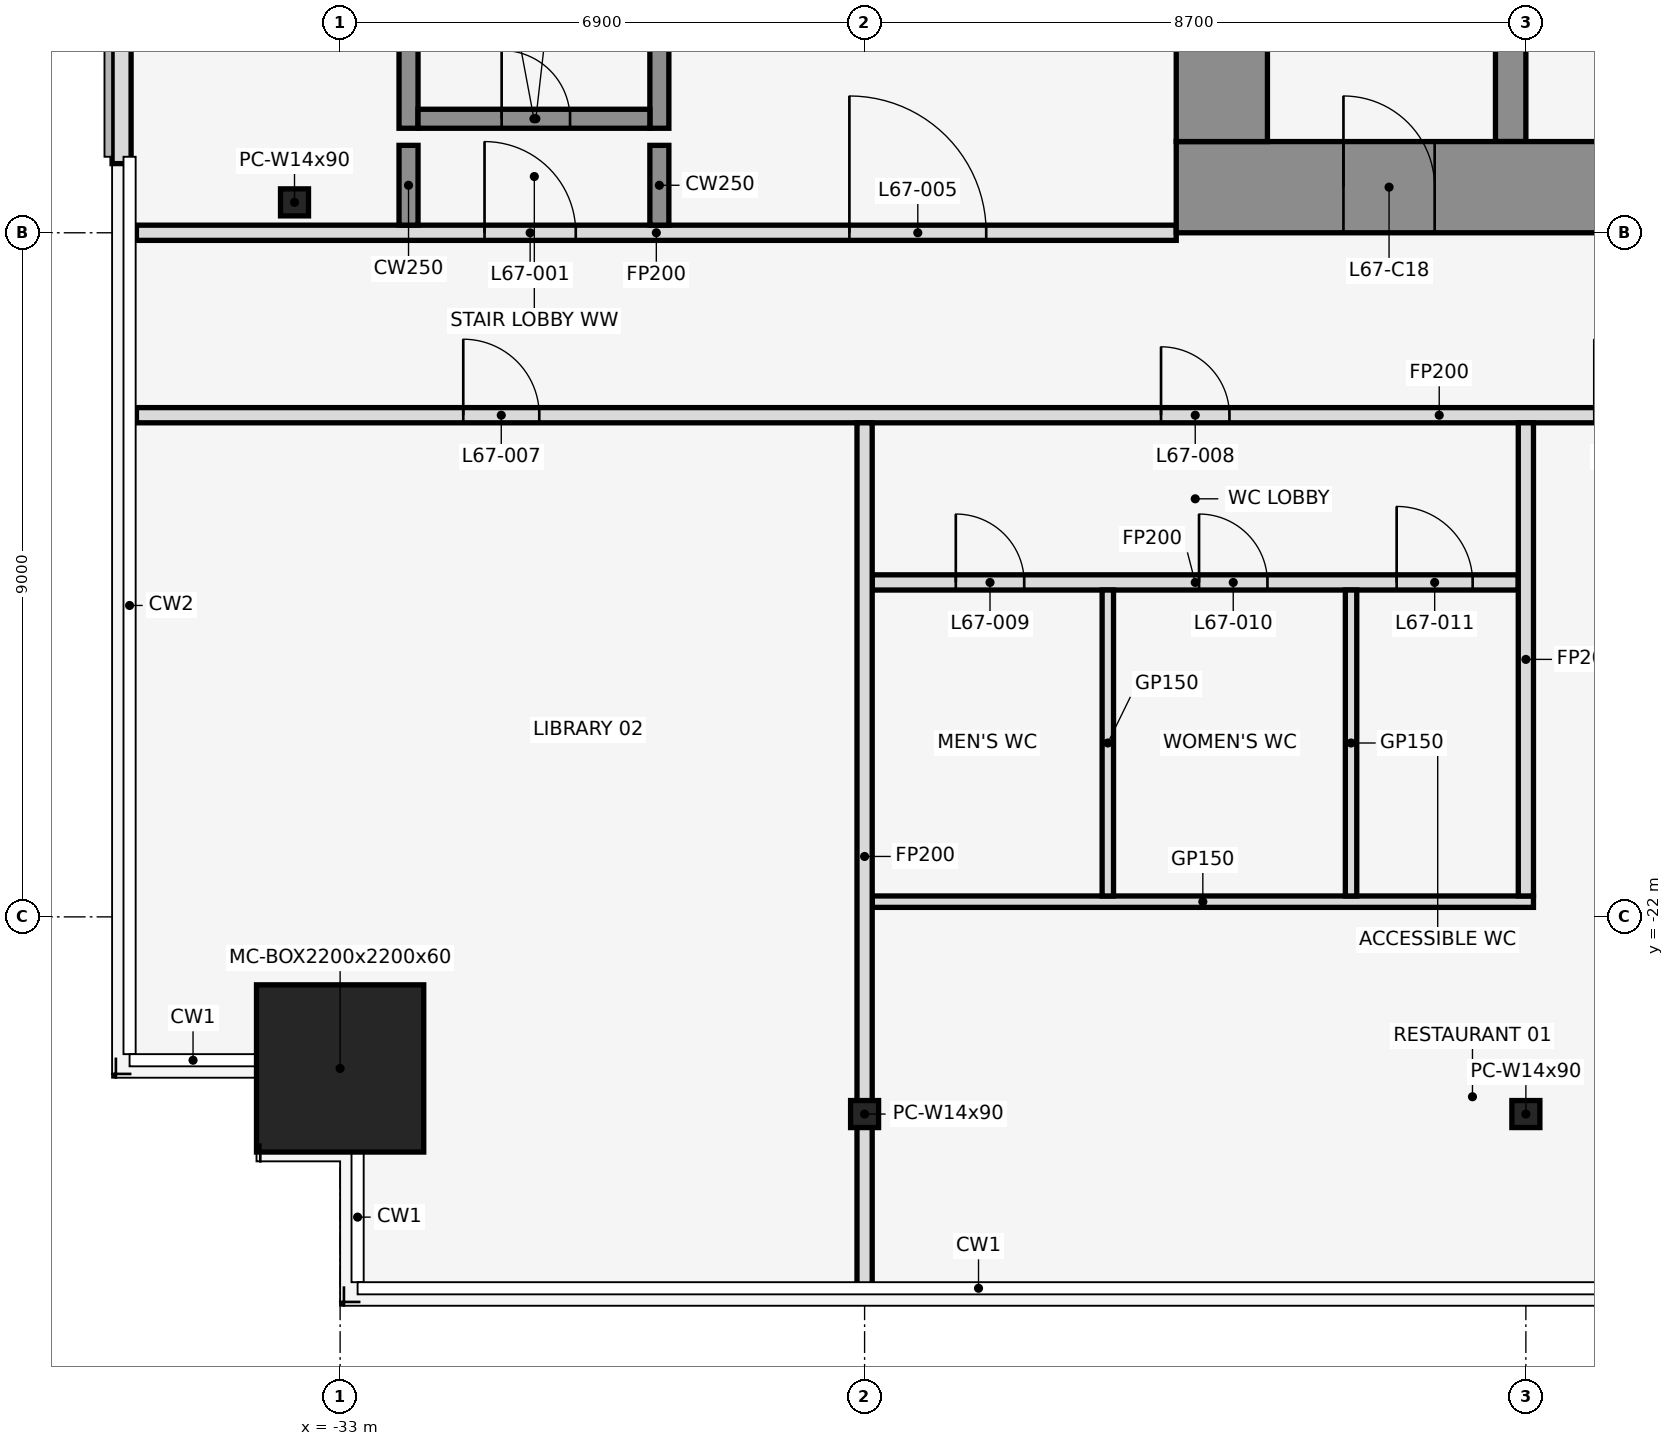
"""IFC4 building model, lengths in metres.
Left out: names, types, materials, properties, quantities, classifications, styles, units other than length and angle.
Written with IfcOpenShell. Run it as: python <this file> out.ifc"""

import sys

from ifc_helpers import new_model, si_unit, direction, frame, frame_2d, origin, origin_2d, place, context, subcontext, project, spatial, rectangle, hollow_rectangle, i_section, extrude, element, fill, save


model = new_model("IFC4")
c1 = context("Model", 3, precision=1e-05, world=origin(), true_north=direction((0.0, 1.0)))
c2 = subcontext(c1, "Body", "Model", "MODEL_VIEW")
j1 = project(units=[si_unit("LENGTHUNIT", "METRE"), si_unit("PLANEANGLEUNIT", "RADIAN")], contexts=[c1])
p1 = place(None, origin())
s1 = spatial("IfcSite", under=j1, at=p1, CompositionType="ELEMENT")
p2 = place(p1, origin())
s2 = spatial("IfcBuilding", under=s1, at=p2, CompositionType="ELEMENT")
p3 = place(p2, frame((0.0, 0.0, 297.5)))
s3 = spatial("IfcBuildingStorey", under=s2, at=p3, CompositionType="ELEMENT", Elevation=297.5)
p4 = place(p3, frame((-33.0, -23.994, 0.0), z_axis=(0.0, 0.0, 1.0), x_axis=(1.0, 0.0, 0.0)))
e1 = element("IfcColumn", 1, at=p4, inside=s3, PredefinedType="COLUMN", context=c2, shape_type="SweptSolid", body=[
    extrude(hollow_rectangle(XDim=2.2, YDim=2.2, WallThickness=0.06, at=origin_2d()), origin(), (0.0, 0.0, 1.0), 4.5),
])
for number, where, z_axis, x_axis in (
    (2, (-26.1, -24.594, 0.0), (0.0, 0.0, 1.0), (1.0, 0.0, 0.0)),
    (3, (-17.4, -24.594, 0.0), (0.0, 0.0, 1.0), (1.0, 0.0, 0.0)),
    (4, (-33.6, -12.6, 0.0), (0.0, 0.0, 1.0), (1.0, 0.0, 0.0)),
):
    element("IfcColumn", number, at=place(p3, frame(where, z_axis=z_axis, x_axis=x_axis)), inside=s3, PredefinedType="COLUMN", context=c2, shape_type="SweptSolid", body=[
        extrude(i_section(OverallWidth=0.368, OverallDepth=0.356, WebThickness=0.011, FlangeThickness=0.018, at=origin_2d()), origin(), (0.0, 0.0, 1.0), 4.5),
    ])
p5 = place(p3, frame((-35.875, -3.0, 0.0), z_axis=(0.0, 0.0, 1.0), x_axis=(0.0, -1.0, 0.0)))
e5 = element("IfcWall", 5, at=p5, inside=s3, PredefinedType="STANDARD", context=c2, shape_type="SweptSolid", body=[
    extrude(rectangle(XDim=9.09, YDim=0.25, at=frame_2d((4.545, 0.0))), origin(), (0.0, 0.0, 1.0), 4.35),
])
p6 = place(p3, frame((-32.1, -11.625, 0.0), z_axis=(0.0, 0.0, 1.0), x_axis=(0.0, 1.0, 0.0)))
e6 = element("IfcWall", 6, at=p6, inside=s3, PredefinedType="SHEAR", context=c2, shape_type="SweptSolid", body=[
    extrude(rectangle(XDim=7.525, YDim=0.25, at=frame_2d((3.762, 0.0))), origin(), (0.0, 0.0, 1.0), 4.5),
])
p7 = place(p3, frame((-28.8, -11.625, 0.0), z_axis=(0.0, 0.0, 1.0), x_axis=(0.0, 1.0, 0.0)))
e7 = element("IfcWall", 7, at=p7, inside=s3, PredefinedType="SHEAR", context=c2, shape_type="SweptSolid", body=[
    extrude(rectangle(XDim=7.25, YDim=0.25, at=frame_2d((3.625, 0.0))), origin(), (0.0, 0.0, 1.0), 4.5),
])
p8 = place(p3, frame((-31.975, -11.5, 0.0), z_axis=(0.0, 0.0, 1.0), x_axis=(1.0, 0.0, 0.0)))
e8 = element("IfcWall", 8, at=p8, inside=s3, PredefinedType="SHEAR", context=c2, shape_type="SweptSolid", body=[
    extrude(rectangle(XDim=3.05, YDim=0.25, at=frame_2d((1.525, 0.0))), origin(), (0.0, 0.0, 1.0), 4.5),
])
p9 = place(p8, frame((1.1, 0.0, 0.0)))
e9 = element("IfcOpeningElement", 9, at=p9, cuts=e8, PredefinedType="OPENING", context=c2, shape_type="SweptSolid", body=[
    extrude(rectangle(XDim=0.9, YDim=2.1, at=frame_2d((0.45, 1.05))), frame((0.0, 0.137, 0.0), z_axis=(0.0, -1.0, 0.0), x_axis=(1.0, 0.0, 0.0)), (0.0, 0.0, 1.0), 0.274),
])
p10 = place(p3, frame((-26.0, -21.8, 0.0), z_axis=(0.0, 0.0, 1.0), x_axis=(1.0, 0.0, 0.0)))
e10 = element("IfcWall", 10, at=p10, inside=s3, PredefinedType="PARTITIONING", context=c2, shape_type="SweptSolid", body=[
    extrude(rectangle(XDim=8.7, YDim=0.15, at=frame_2d((4.35, 0.0))), origin(), (0.0, 0.0, 1.0), 3.418),
])
p11 = place(p3, frame((-26.0, -17.6, 0.0), z_axis=(0.0, 0.0, 1.0), x_axis=(1.0, 0.0, 0.0)))
e11 = element("IfcWall", 11, at=p11, inside=s3, PredefinedType="PARTITIONING", context=c2, shape_type="SweptSolid", body=[
    extrude(rectangle(XDim=8.5, YDim=0.2, at=frame_2d((4.25, 0.0))), origin(), (0.0, 0.0, 1.0), 3.418),
])
p12 = place(p11, frame((1.1, 0.0, 0.0)))
e12 = element("IfcOpeningElement", 12, at=p12, cuts=e11, PredefinedType="OPENING", context=c2, shape_type="SweptSolid", body=[
    extrude(rectangle(XDim=0.9, YDim=2.1, at=frame_2d((0.45, 1.05))), frame((0.0, 0.112, 0.0), z_axis=(0.0, -1.0, 0.0), x_axis=(1.0, 0.0, 0.0)), (0.0, 0.0, 1.0), 0.224),
])
p13 = place(p11, frame((4.3, 0.0, 0.0)))
e13 = element("IfcOpeningElement", 13, at=p13, cuts=e11, PredefinedType="OPENING", context=c2, shape_type="SweptSolid", body=[
    extrude(rectangle(XDim=0.9, YDim=2.1, at=frame_2d((0.45, 1.05))), frame((0.0, 0.112, 0.0), z_axis=(0.0, -1.0, 0.0), x_axis=(1.0, 0.0, 0.0)), (0.0, 0.0, 1.0), 0.224),
])
p14 = place(p11, frame((6.9, 0.0, 0.0)))
e14 = element("IfcOpeningElement", 14, at=p14, cuts=e11, PredefinedType="OPENING", context=c2, shape_type="SweptSolid", body=[
    extrude(rectangle(XDim=1.0, YDim=2.1, at=frame_2d((0.5, 1.05))), frame((0.0, 0.112, 0.0), z_axis=(0.0, -1.0, 0.0), x_axis=(1.0, 0.0, 0.0)), (0.0, 0.0, 1.0), 0.224),
])
p15 = place(p3, frame((-35.68, -15.4, 0.0), z_axis=(0.0, 0.0, 1.0), x_axis=(1.0, 0.0, 0.0)))
e15 = element("IfcWall", 15, at=p15, inside=s3, PredefinedType="PARTITIONING", context=c2, shape_type="SweptSolid", body=[
    extrude(rectangle(XDim=34.28, YDim=0.2, at=frame_2d((17.14, 0.0))), origin(), (0.0, 0.0, 1.0), 3.418),
])
p16 = place(p15, frame((4.3, 0.0, 0.0)))
e16 = element("IfcOpeningElement", 16, at=p16, cuts=e15, PredefinedType="OPENING", context=c2, shape_type="SweptSolid", body=[
    extrude(rectangle(XDim=1.0, YDim=2.1, at=frame_2d((0.5, 1.05))), frame((0.0, 0.112, 0.0), z_axis=(0.0, -1.0, 0.0), x_axis=(1.0, 0.0, 0.0)), (0.0, 0.0, 1.0), 0.224),
])
p17 = place(p15, frame((13.48, 0.0, 0.0)))
e17 = element("IfcOpeningElement", 17, at=p17, cuts=e15, PredefinedType="OPENING", context=c2, shape_type="SweptSolid", body=[
    extrude(rectangle(XDim=0.9, YDim=2.1, at=frame_2d((0.45, 1.05))), frame((0.0, 0.112, 0.0), z_axis=(0.0, -1.0, 0.0), x_axis=(1.0, 0.0, 0.0)), (0.0, 0.0, 1.0), 0.224),
])
p18 = place(p15, frame((19.18, 0.0, 0.0)))
e18 = element("IfcOpeningElement", 18, at=p18, cuts=e15, PredefinedType="OPENING", context=c2, shape_type="SweptSolid", body=[
    extrude(rectangle(XDim=1.0, YDim=2.1, at=frame_2d((0.5, 1.05))), frame((0.0, 0.112, 0.0), z_axis=(0.0, -1.0, 0.0), x_axis=(1.0, 0.0, 0.0)), (0.0, 0.0, 1.0), 0.224),
])
p19 = place(p15, frame((23.58, 0.0, 0.0)))
e19 = element("IfcOpeningElement", 19, at=p19, cuts=e15, PredefinedType="OPENING", context=c2, shape_type="SweptSolid", body=[
    extrude(rectangle(XDim=1.0, YDim=2.1, at=frame_2d((0.5, 1.05))), frame((0.0, 0.112, 0.0), z_axis=(0.0, -1.0, 0.0), x_axis=(1.0, 0.0, 0.0)), (0.0, 0.0, 1.0), 0.224),
])
p20 = place(p3, frame((-35.68, -13.0, 0.0), z_axis=(0.0, 0.0, 1.0), x_axis=(1.0, 0.0, 0.0)))
e20 = element("IfcWall", 20, at=p20, inside=s3, PredefinedType="PARTITIONING", context=c2, shape_type="SweptSolid", body=[
    extrude(rectangle(XDim=13.68, YDim=0.2, at=frame_2d((6.84, 0.0))), origin(), (0.0, 0.0, 1.0), 3.418),
])
p21 = place(p20, frame((4.58, 0.0, 0.0)))
e21 = element("IfcOpeningElement", 21, at=p21, cuts=e20, PredefinedType="OPENING", context=c2, shape_type="SweptSolid", body=[
    extrude(rectangle(XDim=1.2, YDim=2.1, at=frame_2d((0.6, 1.05))), frame((0.0, 0.112, 0.0), z_axis=(0.0, -1.0, 0.0), x_axis=(1.0, 0.0, 0.0)), (0.0, 0.0, 1.0), 0.224),
])
p22 = place(p20, frame((9.38, 0.0, 0.0)))
e22 = element("IfcOpeningElement", 22, at=p22, cuts=e20, PredefinedType="OPENING", context=c2, shape_type="SweptSolid", body=[
    extrude(rectangle(XDim=1.8, YDim=2.1, at=frame_2d((0.9, 1.05))), frame((0.0, 0.112, 0.0), z_axis=(0.0, -1.0, 0.0), x_axis=(1.0, 0.0, 0.0)), (0.0, 0.0, 1.0), 0.224),
])
for number, where, z_axis, x_axis in (
    (23, (-32.1, -12.9, 0.0), (0.0, 0.0, 1.0), (0.0, 1.0, 0.0)),
    (24, (-28.8, -12.9, 0.0), (0.0, 0.0, 1.0), (0.0, 1.0, 0.0)),
):
    element("IfcWall", number, at=place(p3, frame(where, z_axis=z_axis, x_axis=x_axis)), inside=s3, PredefinedType="SHEAR", context=c2, shape_type="SweptSolid", body=[
        extrude(rectangle(XDim=1.05, YDim=0.25, at=frame_2d((0.525, 0.0))), origin(), (0.0, 0.0, 1.0), 4.5),
    ])
p23 = place(p3, frame((-26.1, -26.91, 0.0), z_axis=(0.0, 0.0, 1.0), x_axis=(0.0, 1.0, 0.0)))
e25 = element("IfcWall", 25, at=p23, inside=s3, PredefinedType="PARTITIONING", context=c2, shape_type="SweptSolid", body=[
    extrude(rectangle(XDim=11.41, YDim=0.2, at=frame_2d((5.705, 0.0))), origin(), (0.0, 0.0, 1.0), 3.418),
])
for number, where, z_axis, x_axis in (
    (26, (-22.9, -21.725, 0.0), (0.0, 0.0, 1.0), (0.0, 1.0, 0.0)),
    (27, (-19.7, -21.725, 0.0), (0.0, 0.0, 1.0), (0.0, 1.0, 0.0)),
):
    element("IfcWall", number, at=place(p3, frame(where, z_axis=z_axis, x_axis=x_axis)), inside=s3, PredefinedType="PARTITIONING", context=c2, shape_type="SweptSolid", body=[
        extrude(rectangle(XDim=4.025, YDim=0.15, at=frame_2d((2.013, 0.0))), origin(), (0.0, 0.0, 1.0), 3.418),
    ])
p24 = place(p3, frame((-17.4, -21.725, 0.0), z_axis=(0.0, 0.0, 1.0), x_axis=(0.0, 1.0, 0.0)))
e28 = element("IfcWall", 28, at=p24, inside=s3, PredefinedType="PARTITIONING", context=c2, shape_type="SweptSolid", body=[
    extrude(rectangle(XDim=6.225, YDim=0.2, at=frame_2d((3.113, 0.0))), origin(), (0.0, 0.0, 1.0), 3.418),
])
p25 = place(p3, frame((-17.6, -11.8, 0.0), z_axis=(0.0, 0.0, 1.0), x_axis=(0.0, 1.0, 0.0)))
e29 = element("IfcWall", 29, at=p25, inside=s3, PredefinedType="SHEAR", context=c2, shape_type="SweptSolid", body=[
    extrude(rectangle(XDim=10.6, YDim=0.4, at=frame_2d((5.3, 0.0))), origin(), (0.0, 0.0, 1.0), 4.5),
])
p26 = place(p25, frame((1.25, 0.0, 0.0)))
e30 = element("IfcOpeningElement", 30, at=p26, cuts=e29, PredefinedType="OPENING", context=c2, shape_type="SweptSolid", body=[
    extrude(rectangle(XDim=1.1, YDim=2.1, at=frame_2d((0.55, 1.05))), frame((0.0, 0.212, 0.0), z_axis=(0.0, -1.0, 0.0), x_axis=(1.0, 0.0, 0.0)), (0.0, 0.0, 1.0), 0.424),
])
p27 = place(p25, frame((3.95, 0.0, 0.0)))
e31 = element("IfcOpeningElement", 31, at=p27, cuts=e29, PredefinedType="OPENING", context=c2, shape_type="SweptSolid", body=[
    extrude(rectangle(XDim=1.1, YDim=2.1, at=frame_2d((0.55, 1.05))), frame((0.0, 0.212, 0.0), z_axis=(0.0, -1.0, 0.0), x_axis=(1.0, 0.0, 0.0)), (0.0, 0.0, 1.0), 0.424),
])
p28 = place(p3, frame((-22.0, -12.4, 0.0), z_axis=(0.0, 0.0, 1.0), x_axis=(1.0, 0.0, 0.0)))
e32 = element("IfcWall", 32, at=p28, inside=s3, PredefinedType="SHEAR", context=c2, shape_type="SweptSolid", body=[
    extrude(rectangle(XDim=44.0, YDim=1.2, at=frame_2d((22.0, 0.0))), origin(), (0.0, 0.0, 1.0), 4.5),
])
p29 = place(p28, frame((2.2, 0.0, 0.0)))
e33 = element("IfcOpeningElement", 33, at=p29, cuts=e32, PredefinedType="OPENING", context=c2, shape_type="SweptSolid", body=[
    extrude(rectangle(XDim=1.2, YDim=2.1, at=frame_2d((0.6, 1.05))), frame((0.0, 0.612, 0.0), z_axis=(0.0, -1.0, 0.0), x_axis=(1.0, 0.0, 0.0)), (0.0, 0.0, 1.0), 1.224),
])
p30 = place(p28, frame((21.4, 0.0, 0.0)))
e34 = element("IfcOpeningElement", 34, at=p30, cuts=e32, PredefinedType="OPENING", context=c2, shape_type="SweptSolid", body=[
    extrude(rectangle(XDim=1.2, YDim=2.1, at=frame_2d((0.6, 1.05))), frame((0.0, 0.612, 0.0), z_axis=(0.0, -1.0, 0.0), x_axis=(1.0, 0.0, 0.0)), (0.0, 0.0, 1.0), 1.224),
])
p31 = place(p28, frame((40.6, 0.0, 0.0)))
e35 = element("IfcOpeningElement", 35, at=p31, cuts=e32, PredefinedType="OPENING", context=c2, shape_type="SweptSolid", body=[
    extrude(rectangle(XDim=1.2, YDim=2.1, at=frame_2d((0.6, 1.05))), frame((0.0, 0.612, 0.0), z_axis=(0.0, -1.0, 0.0), x_axis=(1.0, 0.0, 0.0)), (0.0, 0.0, 1.0), 1.224),
])
p32 = place(p28, frame((16.0, 0.0, 0.0)))
e36 = element("IfcOpeningElement", 36, at=p32, cuts=e32, PredefinedType="OPENING", context=c2, shape_type="SweptSolid", body=[
    extrude(rectangle(XDim=1.8, YDim=2.1, at=frame_2d((0.9, 1.05))), frame((0.0, 0.612, 0.0), z_axis=(0.0, -1.0, 0.0), x_axis=(1.0, 0.0, 0.0)), (0.0, 0.0, 1.0), 1.224),
])
p33 = place(p28, frame((6.3, 0.0, 0.0)))
e37 = element("IfcOpeningElement", 37, at=p33, cuts=e32, PredefinedType="OPENING", context=c2, shape_type="SweptSolid", body=[
    extrude(rectangle(XDim=1.2, YDim=2.1, at=frame_2d((0.6, 1.05))), frame((0.0, 0.612, 0.0), z_axis=(0.0, -1.0, 0.0), x_axis=(1.0, 0.0, 0.0)), (0.0, 0.0, 1.0), 1.224),
])
p34 = place(p28, frame((26.2, 0.0, 0.0)))
e38 = element("IfcOpeningElement", 38, at=p34, cuts=e32, PredefinedType="OPENING", context=c2, shape_type="SweptSolid", body=[
    extrude(rectangle(XDim=1.8, YDim=2.1, at=frame_2d((0.9, 1.05))), frame((0.0, 0.612, 0.0), z_axis=(0.0, -1.0, 0.0), x_axis=(1.0, 0.0, 0.0)), (0.0, 0.0, 1.0), 1.224),
])
p35 = place(p28, frame((36.5, 0.0, 0.0)))
e39 = element("IfcOpeningElement", 39, at=p35, cuts=e32, PredefinedType="OPENING", context=c2, shape_type="SweptSolid", body=[
    extrude(rectangle(XDim=1.2, YDim=2.1, at=frame_2d((0.6, 1.05))), frame((0.0, 0.612, 0.0), z_axis=(0.0, -1.0, 0.0), x_axis=(1.0, 0.0, 0.0)), (0.0, 0.0, 1.0), 1.224),
])
p36 = place(p3, frame((-21.4, -11.8, 0.0), z_axis=(0.0, 0.0, 1.0), x_axis=(0.0, 1.0, 0.0)))
e40 = element("IfcWall", 40, at=p36, inside=s3, PredefinedType="SHEAR", context=c2, shape_type="SweptSolid", body=[
    extrude(rectangle(XDim=10.6, YDim=1.2, at=frame_2d((5.3, 0.0))), origin(), (0.0, 0.0, 1.0), 4.5),
])
p37 = place(p21, origin())
e41 = element("IfcDoor", 41, at=p37, inside=s3, OperationType="SINGLE_SWING_LEFT", PredefinedType="DOOR", context=c2, shape_type="SweptSolid", body=[
    extrude(rectangle(XDim=1.2, YDim=2.1, at=frame_2d((0.6, 1.05))), frame((0.0, 0.025, 0.0), z_axis=(0.0, -1.0, 0.0), x_axis=(1.0, 0.0, 0.0)), (0.0, 0.0, 1.0), 0.05),
])
fill(e21, e41)
p38 = place(p9, origin())
e42 = element("IfcDoor", 42, at=p38, inside=s3, OperationType="SINGLE_SWING_LEFT", PredefinedType="DOOR", context=c2, shape_type="SweptSolid", body=[
    extrude(rectangle(XDim=0.9, YDim=2.1, at=frame_2d((0.45, 1.05))), frame((0.0, 0.025, 0.0), z_axis=(0.0, -1.0, 0.0), x_axis=(1.0, 0.0, 0.0)), (0.0, 0.0, 1.0), 0.05),
])
fill(e9, e42)
p39 = place(p22, origin())
e43 = element("IfcDoor", 43, at=p39, inside=s3, OperationType="SINGLE_SWING_LEFT", PredefinedType="DOOR", context=c2, shape_type="SweptSolid", body=[
    extrude(rectangle(XDim=1.8, YDim=2.1, at=frame_2d((0.9, 1.05))), frame((0.0, 0.025, 0.0), z_axis=(0.0, -1.0, 0.0), x_axis=(1.0, 0.0, 0.0)), (0.0, 0.0, 1.0), 0.05),
])
fill(e22, e43)
p40 = place(p16, frame((1.0, 0.0, 0.0), z_axis=(0.0, 0.0, 1.0), x_axis=(-1.0, 0.0, 0.0)))
e44 = element("IfcDoor", 44, at=p40, inside=s3, OperationType="SINGLE_SWING_LEFT", PredefinedType="DOOR", context=c2, shape_type="SweptSolid", body=[
    extrude(rectangle(XDim=1.0, YDim=2.1, at=frame_2d((0.5, 1.05))), frame((0.0, 0.025, 0.0), z_axis=(0.0, -1.0, 0.0), x_axis=(1.0, 0.0, 0.0)), (0.0, 0.0, 1.0), 0.05),
])
fill(e16, e44)
p41 = place(p17, frame((0.9, 0.0, 0.0), z_axis=(0.0, 0.0, 1.0), x_axis=(-1.0, 0.0, 0.0)))
e45 = element("IfcDoor", 45, at=p41, inside=s3, OperationType="SINGLE_SWING_RIGHT", PredefinedType="DOOR", context=c2, shape_type="SweptSolid", body=[
    extrude(rectangle(XDim=0.9, YDim=2.1, at=frame_2d((0.45, 1.05))), frame((0.0, 0.025, 0.0), z_axis=(0.0, -1.0, 0.0), x_axis=(1.0, 0.0, 0.0)), (0.0, 0.0, 1.0), 0.05),
])
fill(e17, e45)
p42 = place(p12, frame((0.9, 0.0, 0.0), z_axis=(0.0, 0.0, 1.0), x_axis=(-1.0, 0.0, 0.0)))
e46 = element("IfcDoor", 46, at=p42, inside=s3, OperationType="SINGLE_SWING_RIGHT", PredefinedType="DOOR", context=c2, shape_type="SweptSolid", body=[
    extrude(rectangle(XDim=0.9, YDim=2.1, at=frame_2d((0.45, 1.05))), frame((0.0, 0.025, 0.0), z_axis=(0.0, -1.0, 0.0), x_axis=(1.0, 0.0, 0.0)), (0.0, 0.0, 1.0), 0.05),
])
fill(e12, e46)
p43 = place(p13, frame((0.9, 0.0, 0.0), z_axis=(0.0, 0.0, 1.0), x_axis=(-1.0, 0.0, 0.0)))
e47 = element("IfcDoor", 47, at=p43, inside=s3, OperationType="SINGLE_SWING_LEFT", PredefinedType="DOOR", context=c2, shape_type="SweptSolid", body=[
    extrude(rectangle(XDim=0.9, YDim=2.1, at=frame_2d((0.45, 1.05))), frame((0.0, 0.025, 0.0), z_axis=(0.0, -1.0, 0.0), x_axis=(1.0, 0.0, 0.0)), (0.0, 0.0, 1.0), 0.05),
])
fill(e13, e47)
p44 = place(p14, frame((1.0, 0.0, 0.0), z_axis=(0.0, 0.0, 1.0), x_axis=(-1.0, 0.0, 0.0)))
e48 = element("IfcDoor", 48, at=p44, inside=s3, OperationType="SINGLE_SWING_RIGHT", PredefinedType="DOOR", context=c2, shape_type="SweptSolid", body=[
    extrude(rectangle(XDim=1.0, YDim=2.1, at=frame_2d((0.5, 1.05))), frame((0.0, 0.025, 0.0), z_axis=(0.0, -1.0, 0.0), x_axis=(1.0, 0.0, 0.0)), (0.0, 0.0, 1.0), 0.05),
])
fill(e14, e48)
p45 = place(p29, frame((1.2, 0.0, 0.0), z_axis=(0.0, 0.0, 1.0), x_axis=(-1.0, 0.0, 0.0)))
e49 = element("IfcDoor", 49, at=p45, inside=s3, OperationType="SINGLE_SWING_RIGHT", PredefinedType="DOOR", context=c2, shape_type="SweptSolid", body=[
    extrude(rectangle(XDim=1.2, YDim=2.1, at=frame_2d((0.6, 1.05))), frame((0.0, 0.025, 0.0), z_axis=(0.0, -1.0, 0.0), x_axis=(1.0, 0.0, 0.0)), (0.0, 0.0, 1.0), 0.05),
])
fill(e33, e49)
save(model, sys.argv[1])
